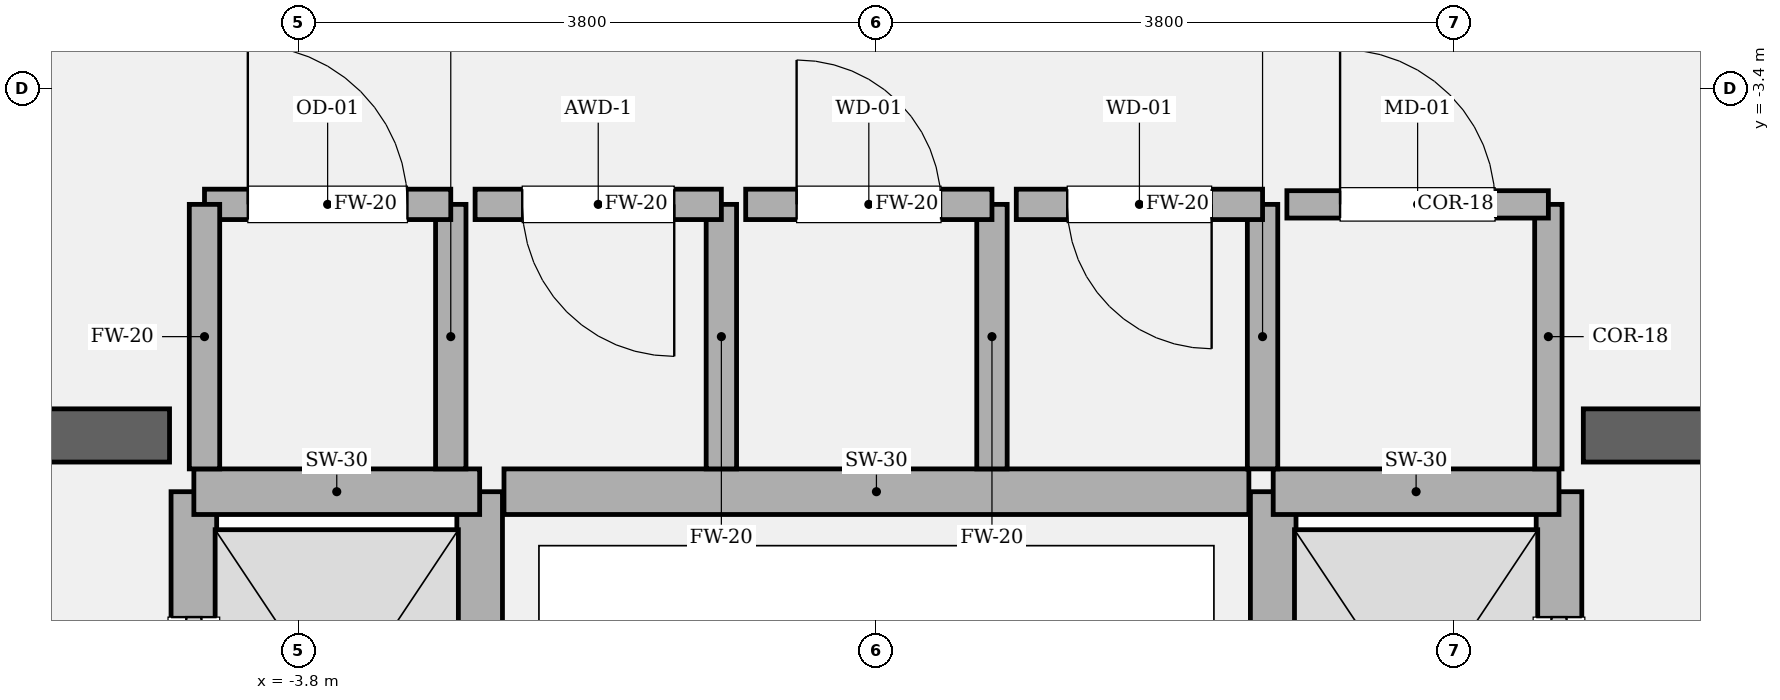
"""IFC4 building model, lengths in metres.
Left out: names, types, materials, properties, quantities, classifications, styles, units other than length and angle.
Written with IfcOpenShell. Run it as: python <this file> out.ifc"""

import sys

from ifc_helpers import new_model, si_unit, direction, frame, frame_2d, origin, place, context, subcontext, project, spatial, rectangle, extrude, element, fill, save


model = new_model("IFC4")
c1 = context("Model", 3, precision=1e-05, world=origin(), true_north=direction((0.0, 1.0)))
c2 = subcontext(c1, "Body", "Model", "MODEL_VIEW")
j1 = project(units=[si_unit("LENGTHUNIT", "METRE"), si_unit("PLANEANGLEUNIT", "RADIAN")], contexts=[c1])
p1 = place(None, origin())
s1 = spatial("IfcSite", under=j1, at=p1, CompositionType="ELEMENT")
p2 = place(p1, origin())
s2 = spatial("IfcBuilding", under=s1, at=p2, CompositionType="ELEMENT")
p3 = place(p2, frame((0.0, 0.0, 16.8)))
s3 = spatial("IfcBuildingStorey", under=s2, at=p3, CompositionType="ELEMENT", Elevation=16.8)
p4 = place(p3, frame((-9.825, -5.68, 0.0), z_axis=(0.0, 0.0, 1.0), x_axis=(1.0, 0.0, 0.0)))
e1 = element("IfcWall", 1, at=p4, inside=s3, PredefinedType="SOLIDWALL", context=c2, shape_type="SweptSolid", body=[
    extrude(rectangle(XDim=5.175, YDim=0.35, at=frame_2d((2.587, 0.0))), origin(), (0.0, 0.0, 1.0), 5.4),
])
p5 = place(p4, frame((1.285, 0.0, 0.0)))
e2 = element("IfcOpeningElement", 2, at=p5, cuts=e1, PredefinedType="OPENING", context=c2, shape_type="SweptSolid", body=[
    extrude(rectangle(XDim=1.18, YDim=2.2, at=frame_2d((0.59, 1.1))), frame((0.0, 0.185, 0.0), z_axis=(0.0, -1.0, 0.0), x_axis=(1.0, 0.0, 0.0)), (0.0, 0.0, 1.0), 0.37),
])
p6 = place(p3, frame((4.65, -5.68, 0.0), z_axis=(0.0, 0.0, 1.0), x_axis=(1.0, 0.0, 0.0)))
e3 = element("IfcWall", 3, at=p6, inside=s3, PredefinedType="SOLIDWALL", context=c2, shape_type="SweptSolid", body=[
    extrude(rectangle(XDim=5.175, YDim=0.35, at=frame_2d((2.587, 0.0))), origin(), (0.0, 0.0, 1.0), 5.4),
])
p7 = place(p6, frame((2.71, 0.0, 0.0)))
e4 = element("IfcOpeningElement", 4, at=p7, cuts=e3, PredefinedType="OPENING", context=c2, shape_type="SweptSolid", body=[
    extrude(rectangle(XDim=1.18, YDim=2.2, at=frame_2d((0.59, 1.1))), frame((0.0, 0.185, 0.0), z_axis=(0.0, -1.0, 0.0), x_axis=(1.0, 0.0, 0.0)), (0.0, 0.0, 1.0), 0.37),
])
p8 = place(p3, frame((-4.49, -8.82, 0.0), z_axis=(0.0, 0.0, 1.0), x_axis=(0.0, 1.0, 0.0)))
e5 = element("IfcWall", 5, at=p8, inside=s3, PredefinedType="SOLIDWALL", context=c2, shape_type="SweptSolid", body=[
    extrude(rectangle(XDim=2.77, YDim=0.3, at=frame_2d((1.385, 0.0))), origin(), (0.0, 0.0, 1.0), 5.02),
])
p9 = place(p8, frame((0.825, 0.0, 0.0)))
e6 = element("IfcOpeningElement", 6, at=p9, cuts=e5, PredefinedType="OPENING", context=c2, shape_type="SweptSolid", body=[
    extrude(rectangle(XDim=1.12, YDim=2.25, at=frame_2d((0.56, 1.125))), frame((0.0, 0.16, 0.0), z_axis=(0.0, -1.0, 0.0), x_axis=(1.0, 0.0, 0.0)), (0.0, 0.0, 1.0), 0.32),
])
p10 = place(p3, frame((-2.61, -8.82, 0.0), z_axis=(0.0, 0.0, 1.0), x_axis=(0.0, 1.0, 0.0)))
e7 = element("IfcWall", 7, at=p10, inside=s3, PredefinedType="SOLIDWALL", context=c2, shape_type="SweptSolid", body=[
    extrude(rectangle(XDim=2.77, YDim=0.3, at=frame_2d((1.385, 0.0))), origin(), (0.0, 0.0, 1.0), 5.02),
])
p11 = place(p3, frame((-4.49, -6.05, 0.0), z_axis=(0.0, 0.0, 1.0), x_axis=(1.0, 0.0, 0.0)))
e8 = element("IfcWall", 8, at=p11, inside=s3, PredefinedType="SOLIDWALL", context=c2, shape_type="SweptSolid", body=[
    extrude(rectangle(XDim=1.88, YDim=0.3, at=frame_2d((0.94, 0.0))), origin(), (0.0, 0.0, 1.0), 5.02),
])
p12 = place(p3, frame((4.49, -8.82, 0.0), z_axis=(0.0, 0.0, 1.0), x_axis=(0.0, 1.0, 0.0)))
e9 = element("IfcWall", 9, at=p12, inside=s3, PredefinedType="SOLIDWALL", context=c2, shape_type="SweptSolid", body=[
    extrude(rectangle(XDim=2.77, YDim=0.3, at=frame_2d((1.385, 0.0))), origin(), (0.0, 0.0, 1.0), 5.02),
])
p13 = place(p12, frame((0.825, 0.0, 0.0)))
e10 = element("IfcOpeningElement", 10, at=p13, cuts=e9, PredefinedType="OPENING", context=c2, shape_type="SweptSolid", body=[
    extrude(rectangle(XDim=1.12, YDim=2.25, at=frame_2d((0.56, 1.125))), frame((0.0, 0.16, 0.0), z_axis=(0.0, -1.0, 0.0), x_axis=(1.0, 0.0, 0.0)), (0.0, 0.0, 1.0), 0.32),
])
p14 = place(p3, frame((2.61, -8.82, 0.0), z_axis=(0.0, 0.0, 1.0), x_axis=(0.0, 1.0, 0.0)))
e11 = element("IfcWall", 11, at=p14, inside=s3, PredefinedType="SOLIDWALL", context=c2, shape_type="SweptSolid", body=[
    extrude(rectangle(XDim=2.77, YDim=0.3, at=frame_2d((1.385, 0.0))), origin(), (0.0, 0.0, 1.0), 5.02),
])
p15 = place(p3, frame((2.61, -6.05, 0.0), z_axis=(0.0, 0.0, 1.0), x_axis=(1.0, 0.0, 0.0)))
e12 = element("IfcWall", 12, at=p15, inside=s3, PredefinedType="SOLIDWALL", context=c2, shape_type="SweptSolid", body=[
    extrude(rectangle(XDim=1.88, YDim=0.3, at=frame_2d((0.94, 0.0))), origin(), (0.0, 0.0, 1.0), 5.02),
])
p16 = place(p3, frame((-2.45, -6.05, 0.0), z_axis=(0.0, 0.0, 1.0), x_axis=(1.0, 0.0, 0.0)))
e13 = element("IfcWall", 13, at=p16, inside=s3, PredefinedType="SOLIDWALL", context=c2, shape_type="SweptSolid", body=[
    extrude(rectangle(XDim=4.9, YDim=0.3, at=frame_2d((2.45, 0.0))), origin(), (0.0, 0.0, 1.0), 5.02),
])
p17 = place(p3, frame((-2.8, -5.9, 0.0), z_axis=(0.0, 0.0, 1.0), x_axis=(0.0, 1.0, 0.0)))
e14 = element("IfcWall", 14, at=p17, inside=s3, PredefinedType="SOLIDWALL", context=c2, shape_type="SweptSolid", body=[
    extrude(rectangle(XDim=1.74, YDim=0.2, at=frame_2d((0.87, 0.0))), origin(), (0.0, 0.0, 1.0), 5.02),
])
p18 = place(p3, frame((-2.8, -4.16, 0.0), z_axis=(0.0, 0.0, 1.0), x_axis=(-1.0, 0.0, 0.0)))
e15 = element("IfcWall", 15, at=p18, inside=s3, PredefinedType="SOLIDWALL", context=c2, shape_type="SweptSolid", body=[
    extrude(rectangle(XDim=1.62, YDim=0.2, at=frame_2d((0.81, 0.0))), origin(), (0.0, 0.0, 1.0), 5.02),
])
p19 = place(p18, frame((0.285, 0.0, 0.0)))
e16 = element("IfcOpeningElement", 16, at=p19, cuts=e15, PredefinedType="OPENING", context=c2, shape_type="SweptSolid", body=[
    extrude(rectangle(XDim=1.05, YDim=2.2, at=frame_2d((0.525, 1.1))), frame((0.0, 0.11, 0.0), z_axis=(0.0, -1.0, 0.0), x_axis=(1.0, 0.0, 0.0)), (0.0, 0.0, 1.0), 0.22),
])
for number, where, z_axis, x_axis in (
    (17, (-4.42, -4.16, 0.0), (0.0, 0.0, 1.0), (0.0, -1.0, 0.0)),
    (18, (-1.02, -5.9, 0.0), (0.0, 0.0, 1.0), (0.0, 1.0, 0.0)),
):
    element("IfcWall", number, at=place(p3, frame(where, z_axis=z_axis, x_axis=x_axis)), inside=s3, PredefinedType="SOLIDWALL", context=c2, shape_type="SweptSolid", body=[
        extrude(rectangle(XDim=1.74, YDim=0.2, at=frame_2d((0.87, 0.0))), origin(), (0.0, 0.0, 1.0), 5.02),
    ])
p20 = place(p3, frame((-1.02, -4.16, 0.0), z_axis=(0.0, 0.0, 1.0), x_axis=(-1.0, 0.0, 0.0)))
e19 = element("IfcWall", 19, at=p20, inside=s3, PredefinedType="SOLIDWALL", context=c2, shape_type="SweptSolid", body=[
    extrude(rectangle(XDim=1.62, YDim=0.2, at=frame_2d((0.81, 0.0))), origin(), (0.0, 0.0, 1.0), 5.02),
])
p21 = place(p20, frame((0.31, 0.0, 0.0)))
e20 = element("IfcOpeningElement", 20, at=p21, cuts=e19, PredefinedType="OPENING", context=c2, shape_type="SweptSolid", body=[
    extrude(rectangle(XDim=1.0, YDim=2.15, at=frame_2d((0.5, 1.075))), frame((0.0, 0.11, 0.0), z_axis=(0.0, -1.0, 0.0), x_axis=(1.0, 0.0, 0.0)), (0.0, 0.0, 1.0), 0.22),
])
p22 = place(p3, frame((0.76, -5.9, 0.0), z_axis=(0.0, 0.0, 1.0), x_axis=(0.0, 1.0, 0.0)))
e21 = element("IfcWall", 21, at=p22, inside=s3, PredefinedType="SOLIDWALL", context=c2, shape_type="SweptSolid", body=[
    extrude(rectangle(XDim=1.74, YDim=0.2, at=frame_2d((0.87, 0.0))), origin(), (0.0, 0.0, 1.0), 5.02),
])
p23 = place(p3, frame((0.76, -4.16, 0.0), z_axis=(0.0, 0.0, 1.0), x_axis=(-1.0, 0.0, 0.0)))
e22 = element("IfcWall", 22, at=p23, inside=s3, PredefinedType="SOLIDWALL", context=c2, shape_type="SweptSolid", body=[
    extrude(rectangle(XDim=1.62, YDim=0.2, at=frame_2d((0.81, 0.0))), origin(), (0.0, 0.0, 1.0), 5.02),
])
p24 = place(p23, frame((0.335, 0.0, 0.0)))
e23 = element("IfcOpeningElement", 23, at=p24, cuts=e22, PredefinedType="OPENING", context=c2, shape_type="SweptSolid", body=[
    extrude(rectangle(XDim=0.95, YDim=2.15, at=frame_2d((0.475, 1.075))), frame((0.0, 0.11, 0.0), z_axis=(0.0, -1.0, 0.0), x_axis=(1.0, 0.0, 0.0)), (0.0, 0.0, 1.0), 0.22),
])
p25 = place(p3, frame((2.54, -5.9, 0.0), z_axis=(0.0, 0.0, 1.0), x_axis=(0.0, 1.0, 0.0)))
e24 = element("IfcWall", 24, at=p25, inside=s3, PredefinedType="SOLIDWALL", context=c2, shape_type="SweptSolid", body=[
    extrude(rectangle(XDim=1.74, YDim=0.2, at=frame_2d((0.87, 0.0))), origin(), (0.0, 0.0, 1.0), 5.02),
])
p26 = place(p3, frame((2.54, -4.16, 0.0), z_axis=(0.0, 0.0, 1.0), x_axis=(-1.0, 0.0, 0.0)))
e25 = element("IfcWall", 25, at=p26, inside=s3, PredefinedType="SOLIDWALL", context=c2, shape_type="SweptSolid", body=[
    extrude(rectangle(XDim=1.62, YDim=0.2, at=frame_2d((0.81, 0.0))), origin(), (0.0, 0.0, 1.0), 5.02),
])
p27 = place(p26, frame((0.335, 0.0, 0.0)))
e26 = element("IfcOpeningElement", 26, at=p27, cuts=e25, PredefinedType="OPENING", context=c2, shape_type="SweptSolid", body=[
    extrude(rectangle(XDim=0.95, YDim=2.15, at=frame_2d((0.475, 1.075))), frame((0.0, 0.11, 0.0), z_axis=(0.0, -1.0, 0.0), x_axis=(1.0, 0.0, 0.0)), (0.0, 0.0, 1.0), 0.22),
])
p28 = place(p3, frame((4.42, -5.9, 0.0), z_axis=(0.0, 0.0, 1.0), x_axis=(0.0, 1.0, 0.0)))
e27 = element("IfcWall", 27, at=p28, inside=s3, PredefinedType="PARTITIONING", context=c2, shape_type="SweptSolid", body=[
    extrude(rectangle(XDim=1.74, YDim=0.18, at=frame_2d((0.87, 0.0))), origin(), (0.0, 0.0, 1.0), 5.02),
])
p29 = place(p3, frame((4.42, -4.16, 0.0), z_axis=(0.0, 0.0, 1.0), x_axis=(-1.0, 0.0, 0.0)))
e28 = element("IfcWall", 28, at=p29, inside=s3, PredefinedType="PARTITIONING", context=c2, shape_type="SweptSolid", body=[
    extrude(rectangle(XDim=1.72, YDim=0.18, at=frame_2d((0.86, 0.0))), origin(), (0.0, 0.0, 1.0), 5.02),
])
p30 = place(p29, frame((0.35, 0.0, 0.0)))
e29 = element("IfcOpeningElement", 29, at=p30, cuts=e28, PredefinedType="OPENING", context=c2, shape_type="SweptSolid", body=[
    extrude(rectangle(XDim=1.02, YDim=2.2, at=frame_2d((0.51, 1.1))), frame((0.0, 0.1, 0.0), z_axis=(0.0, -1.0, 0.0), x_axis=(1.0, 0.0, 0.0)), (0.0, 0.0, 1.0), 0.2),
])
p31 = place(p9, origin())
e30 = element("IfcDoor", 30, at=p31, inside=s3, OperationType="SLIDING_TO_LEFT", PredefinedType="DOOR", context=c2, shape_type="SweptSolid", body=[
    extrude(rectangle(XDim=1.12, YDim=2.25, at=frame_2d((0.56, 1.125))), frame((0.0, 0.025, 0.0), z_axis=(0.0, -1.0, 0.0), x_axis=(1.0, 0.0, 0.0)), (0.0, 0.0, 1.0), 0.05),
])
fill(e6, e30)
p32 = place(p13, origin())
e31 = element("IfcDoor", 31, at=p32, inside=s3, OperationType="SLIDING_TO_RIGHT", PredefinedType="DOOR", context=c2, shape_type="SweptSolid", body=[
    extrude(rectangle(XDim=1.12, YDim=2.25, at=frame_2d((0.56, 1.125))), frame((0.0, 0.025, 0.0), z_axis=(0.0, -1.0, 0.0), x_axis=(1.0, 0.0, 0.0)), (0.0, 0.0, 1.0), 0.05),
])
fill(e10, e31)
p33 = place(p19, origin())
e32 = element("IfcDoor", 32, at=p33, inside=s3, OperationType="SINGLE_SWING_RIGHT", PredefinedType="DOOR", context=c2, shape_type="SweptSolid", body=[
    extrude(rectangle(XDim=1.05, YDim=2.2, at=frame_2d((0.525, 1.1))), frame((0.0, 0.025, 0.0), z_axis=(0.0, -1.0, 0.0), x_axis=(1.0, 0.0, 0.0)), (0.0, 0.0, 1.0), 0.05),
])
fill(e16, e32)
p34 = place(p21, origin())
e33 = element("IfcDoor", 33, at=p34, inside=s3, OperationType="SINGLE_SWING_LEFT", PredefinedType="DOOR", context=c2, shape_type="SweptSolid", body=[
    extrude(rectangle(XDim=1.0, YDim=2.15, at=frame_2d((0.5, 1.075))), frame((0.0, 0.025, 0.0), z_axis=(0.0, -1.0, 0.0), x_axis=(1.0, 0.0, 0.0)), (0.0, 0.0, 1.0), 0.05),
])
fill(e20, e33)
p35 = place(p24, origin())
e34 = element("IfcDoor", 34, at=p35, inside=s3, OperationType="SINGLE_SWING_RIGHT", PredefinedType="DOOR", context=c2, shape_type="SweptSolid", body=[
    extrude(rectangle(XDim=0.95, YDim=2.15, at=frame_2d((0.475, 1.075))), frame((0.0, 0.025, 0.0), z_axis=(0.0, -1.0, 0.0), x_axis=(1.0, 0.0, 0.0)), (0.0, 0.0, 1.0), 0.05),
])
fill(e23, e34)
p36 = place(p27, origin())
e35 = element("IfcDoor", 35, at=p36, inside=s3, OperationType="SINGLE_SWING_LEFT", PredefinedType="DOOR", context=c2, shape_type="SweptSolid", body=[
    extrude(rectangle(XDim=0.95, YDim=2.15, at=frame_2d((0.475, 1.075))), frame((0.0, 0.025, 0.0), z_axis=(0.0, -1.0, 0.0), x_axis=(1.0, 0.0, 0.0)), (0.0, 0.0, 1.0), 0.05),
])
fill(e26, e35)
p37 = place(p30, origin())
e36 = element("IfcDoor", 36, at=p37, inside=s3, OperationType="SINGLE_SWING_RIGHT", PredefinedType="DOOR", context=c2, shape_type="SweptSolid", body=[
    extrude(rectangle(XDim=1.02, YDim=2.2, at=frame_2d((0.51, 1.1))), frame((0.0, 0.025, 0.0), z_axis=(0.0, -1.0, 0.0), x_axis=(1.0, 0.0, 0.0)), (0.0, 0.0, 1.0), 0.05),
])
fill(e29, e36)
save(model, sys.argv[1])
